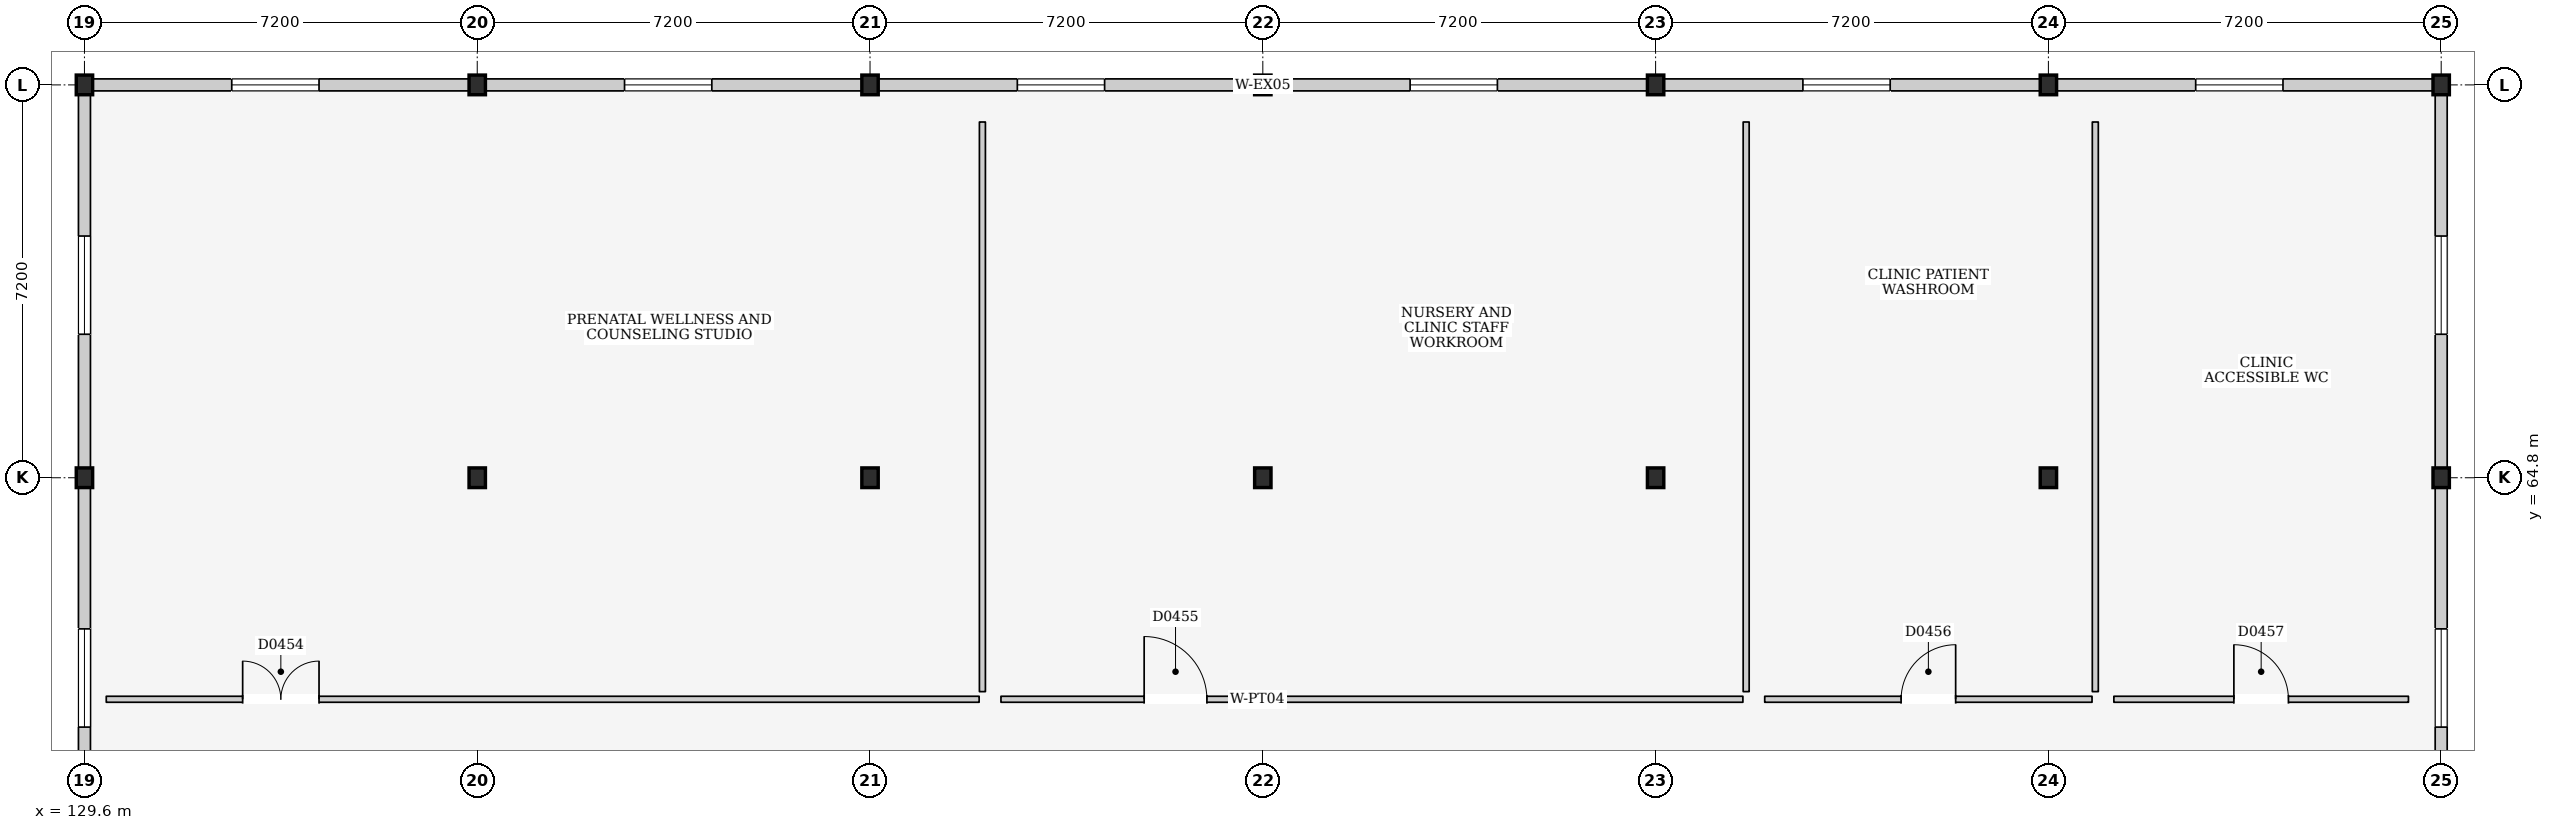
"""IFC4 building model, lengths in metres.
Left out: names, types, materials, properties, quantities, classifications, styles, units other than length and angle.
Written with IfcOpenShell. Run it as: python <this file> out.ifc"""

import sys

from ifc_helpers import new_model, si_unit, direction, frame, frame_2d, origin, origin_2d, place, context, subcontext, project, spatial, rectangle, i_section, extrude, element, fill, save


model = new_model("IFC4")
c1 = context("Model", 3, precision=1e-05, world=origin(), true_north=direction((0.0, 1.0)))
c2 = subcontext(c1, "Body", "Model", "MODEL_VIEW")
j1 = project(units=[si_unit("LENGTHUNIT", "METRE"), si_unit("PLANEANGLEUNIT", "RADIAN")], contexts=[c1])
p1 = place(None, origin())
s1 = spatial("IfcSite", under=j1, at=p1, CompositionType="ELEMENT")
p2 = place(p1, origin())
s2 = spatial("IfcBuilding", under=s1, at=p2, CompositionType="ELEMENT")
p3 = place(p2, frame((0.0, 0.0, 4.5)))
s3 = spatial("IfcBuildingStorey", under=s2, at=p3, CompositionType="ELEMENT", Elevation=4.5)
for number, where, z_axis, x_axis in (
    (1, (129.6, 64.8, 0.0), (0.0, 0.0, 1.0), (1.0, 0.0, 0.0)),
    (2, (129.6, 72.0, 0.0), (0.0, 0.0, 1.0), (1.0, 0.0, 0.0)),
    (3, (136.8, 64.8, 0.0), (0.0, 0.0, 1.0), (1.0, 0.0, 0.0)),
    (4, (136.8, 72.0, 0.0), (0.0, 0.0, 1.0), (1.0, 0.0, 0.0)),
    (5, (144.0, 64.8, 0.0), (0.0, 0.0, 1.0), (1.0, 0.0, 0.0)),
    (6, (144.0, 72.0, 0.0), (0.0, 0.0, 1.0), (1.0, 0.0, 0.0)),
    (7, (151.2, 64.8, 0.0), (0.0, 0.0, 1.0), (1.0, 0.0, 0.0)),
    (8, (151.2, 72.0, 0.0), (0.0, 0.0, 1.0), (1.0, 0.0, 0.0)),
    (9, (158.4, 64.8, 0.0), (0.0, 0.0, 1.0), (1.0, 0.0, 0.0)),
    (10, (158.4, 72.0, 0.0), (0.0, 0.0, 1.0), (1.0, 0.0, 0.0)),
    (11, (165.6, 64.8, 0.0), (0.0, 0.0, 1.0), (1.0, 0.0, 0.0)),
    (12, (165.6, 72.0, 0.0), (0.0, 0.0, 1.0), (1.0, 0.0, 0.0)),
    (13, (172.8, 64.8, 0.0), (0.0, 0.0, 1.0), (1.0, 0.0, 0.0)),
    (14, (172.8, 72.0, 0.0), (0.0, 0.0, 1.0), (1.0, 0.0, 0.0)),
):
    element("IfcColumn", number, at=place(p3, frame(where, z_axis=z_axis, x_axis=x_axis)), inside=s3, PredefinedType="COLUMN", context=c2, shape_type="SweptSolid", body=[
        extrude(i_section(OverallWidth=0.3, OverallDepth=0.36, WebThickness=0.012, FlangeThickness=0.022, at=origin_2d()), origin(), (0.0, 0.0, 1.0), 4.5),
    ])
p4 = place(p3, frame((129.75, 72.0, 0.0), z_axis=(0.0, 0.0, 1.0), x_axis=(1.0, 0.0, 0.0)))
e15 = element("IfcWall", 15, at=p4, inside=s3, PredefinedType="ELEMENTEDWALL", context=c2, shape_type="SweptSolid", body=[
    extrude(rectangle(XDim=6.9, YDim=0.22, at=frame_2d((3.45, 0.0))), origin(), (0.0, 0.0, 1.0), 3.9),
])
p5 = place(p4, frame((2.55, 0.0, 0.95)))
e16 = element("IfcOpeningElement", 16, at=p5, cuts=e15, PredefinedType="OPENING", context=c2, shape_type="SweptSolid", body=[
    extrude(rectangle(XDim=1.6, YDim=1.5, at=frame_2d((0.8, 0.75))), frame((0.0, 0.125, 0.0), z_axis=(0.0, -1.0, 0.0), x_axis=(1.0, 0.0, 0.0)), (0.0, 0.0, 1.0), 0.25),
])
p6 = place(p3, frame((136.95, 72.0, 0.0), z_axis=(0.0, 0.0, 1.0), x_axis=(1.0, 0.0, 0.0)))
e17 = element("IfcWall", 17, at=p6, inside=s3, PredefinedType="ELEMENTEDWALL", context=c2, shape_type="SweptSolid", body=[
    extrude(rectangle(XDim=6.9, YDim=0.22, at=frame_2d((3.45, 0.0))), origin(), (0.0, 0.0, 1.0), 3.9),
])
p7 = place(p6, frame((2.55, 0.0, 0.95)))
e18 = element("IfcOpeningElement", 18, at=p7, cuts=e17, PredefinedType="OPENING", context=c2, shape_type="SweptSolid", body=[
    extrude(rectangle(XDim=1.6, YDim=1.5, at=frame_2d((0.8, 0.75))), frame((0.0, 0.125, 0.0), z_axis=(0.0, -1.0, 0.0), x_axis=(1.0, 0.0, 0.0)), (0.0, 0.0, 1.0), 0.25),
])
p8 = place(p3, frame((144.15, 72.0, 0.0), z_axis=(0.0, 0.0, 1.0), x_axis=(1.0, 0.0, 0.0)))
e19 = element("IfcWall", 19, at=p8, inside=s3, PredefinedType="ELEMENTEDWALL", context=c2, shape_type="SweptSolid", body=[
    extrude(rectangle(XDim=6.9, YDim=0.22, at=frame_2d((3.45, 0.0))), origin(), (0.0, 0.0, 1.0), 3.9),
])
p9 = place(p8, frame((2.55, 0.0, 0.95)))
e20 = element("IfcOpeningElement", 20, at=p9, cuts=e19, PredefinedType="OPENING", context=c2, shape_type="SweptSolid", body=[
    extrude(rectangle(XDim=1.6, YDim=1.5, at=frame_2d((0.8, 0.75))), frame((0.0, 0.125, 0.0), z_axis=(0.0, -1.0, 0.0), x_axis=(1.0, 0.0, 0.0)), (0.0, 0.0, 1.0), 0.25),
])
p10 = place(p3, frame((151.35, 72.0, 0.0), z_axis=(0.0, 0.0, 1.0), x_axis=(1.0, 0.0, 0.0)))
e21 = element("IfcWall", 21, at=p10, inside=s3, PredefinedType="ELEMENTEDWALL", context=c2, shape_type="SweptSolid", body=[
    extrude(rectangle(XDim=6.9, YDim=0.22, at=frame_2d((3.45, 0.0))), origin(), (0.0, 0.0, 1.0), 3.9),
])
p11 = place(p10, frame((2.55, 0.0, 0.95)))
e22 = element("IfcOpeningElement", 22, at=p11, cuts=e21, PredefinedType="OPENING", context=c2, shape_type="SweptSolid", body=[
    extrude(rectangle(XDim=1.6, YDim=1.5, at=frame_2d((0.8, 0.75))), frame((0.0, 0.125, 0.0), z_axis=(0.0, -1.0, 0.0), x_axis=(1.0, 0.0, 0.0)), (0.0, 0.0, 1.0), 0.25),
])
p12 = place(p3, frame((158.55, 72.0, 0.0), z_axis=(0.0, 0.0, 1.0), x_axis=(1.0, 0.0, 0.0)))
e23 = element("IfcWall", 23, at=p12, inside=s3, PredefinedType="ELEMENTEDWALL", context=c2, shape_type="SweptSolid", body=[
    extrude(rectangle(XDim=6.9, YDim=0.22, at=frame_2d((3.45, 0.0))), origin(), (0.0, 0.0, 1.0), 3.9),
])
p13 = place(p12, frame((2.55, 0.0, 0.95)))
e24 = element("IfcOpeningElement", 24, at=p13, cuts=e23, PredefinedType="OPENING", context=c2, shape_type="SweptSolid", body=[
    extrude(rectangle(XDim=1.6, YDim=1.5, at=frame_2d((0.8, 0.75))), frame((0.0, 0.125, 0.0), z_axis=(0.0, -1.0, 0.0), x_axis=(1.0, 0.0, 0.0)), (0.0, 0.0, 1.0), 0.25),
])
p14 = place(p3, frame((165.75, 72.0, 0.0), z_axis=(0.0, 0.0, 1.0), x_axis=(1.0, 0.0, 0.0)))
e25 = element("IfcWall", 25, at=p14, inside=s3, PredefinedType="ELEMENTEDWALL", context=c2, shape_type="SweptSolid", body=[
    extrude(rectangle(XDim=6.9, YDim=0.22, at=frame_2d((3.45, 0.0))), origin(), (0.0, 0.0, 1.0), 3.9),
])
p15 = place(p14, frame((2.55, 0.0, 0.95)))
e26 = element("IfcOpeningElement", 26, at=p15, cuts=e25, PredefinedType="OPENING", context=c2, shape_type="SweptSolid", body=[
    extrude(rectangle(XDim=1.6, YDim=1.5, at=frame_2d((0.8, 0.75))), frame((0.0, 0.125, 0.0), z_axis=(0.0, -1.0, 0.0), x_axis=(1.0, 0.0, 0.0)), (0.0, 0.0, 1.0), 0.25),
])
p16 = place(p3, frame((129.6, 57.78, 0.0), z_axis=(0.0, 0.0, 1.0), x_axis=(0.0, 1.0, 0.0)))
e27 = element("IfcWall", 27, at=p16, inside=s3, PredefinedType="ELEMENTEDWALL", context=c2, shape_type="SweptSolid", body=[
    extrude(rectangle(XDim=6.84, YDim=0.22, at=frame_2d((3.42, 0.0))), origin(), (0.0, 0.0, 1.0), 3.9),
])
p17 = place(p16, frame((2.45, 0.0, 0.9)))
e28 = element("IfcOpeningElement", 28, at=p17, cuts=e27, PredefinedType="OPENING", context=c2, shape_type="SweptSolid", body=[
    extrude(rectangle(XDim=1.8, YDim=1.8, at=frame_2d((0.9, 0.9))), frame((0.0, 0.125, 0.0), z_axis=(0.0, -1.0, 0.0), x_axis=(1.0, 0.0, 0.0)), (0.0, 0.0, 1.0), 0.25),
])
p18 = place(p3, frame((172.8, 57.78, 0.0), z_axis=(0.0, 0.0, 1.0), x_axis=(0.0, 1.0, 0.0)))
e29 = element("IfcWall", 29, at=p18, inside=s3, PredefinedType="ELEMENTEDWALL", context=c2, shape_type="SweptSolid", body=[
    extrude(rectangle(XDim=6.84, YDim=0.22, at=frame_2d((3.42, 0.0))), origin(), (0.0, 0.0, 1.0), 3.9),
])
p19 = place(p18, frame((2.45, 0.0, 0.9)))
e30 = element("IfcOpeningElement", 30, at=p19, cuts=e29, PredefinedType="OPENING", context=c2, shape_type="SweptSolid", body=[
    extrude(rectangle(XDim=1.8, YDim=1.8, at=frame_2d((0.9, 0.9))), frame((0.0, 0.125, 0.0), z_axis=(0.0, -1.0, 0.0), x_axis=(1.0, 0.0, 0.0)), (0.0, 0.0, 1.0), 0.25),
])
p20 = place(p3, frame((129.6, 64.98, 0.0), z_axis=(0.0, 0.0, 1.0), x_axis=(0.0, 1.0, 0.0)))
e31 = element("IfcWall", 31, at=p20, inside=s3, PredefinedType="ELEMENTEDWALL", context=c2, shape_type="SweptSolid", body=[
    extrude(rectangle(XDim=6.84, YDim=0.22, at=frame_2d((3.42, 0.0))), origin(), (0.0, 0.0, 1.0), 3.9),
])
p21 = place(p20, frame((2.45, 0.0, 0.9)))
e32 = element("IfcOpeningElement", 32, at=p21, cuts=e31, PredefinedType="OPENING", context=c2, shape_type="SweptSolid", body=[
    extrude(rectangle(XDim=1.8, YDim=1.8, at=frame_2d((0.9, 0.9))), frame((0.0, 0.125, 0.0), z_axis=(0.0, -1.0, 0.0), x_axis=(1.0, 0.0, 0.0)), (0.0, 0.0, 1.0), 0.25),
])
p22 = place(p3, frame((172.8, 64.98, 0.0), z_axis=(0.0, 0.0, 1.0), x_axis=(0.0, 1.0, 0.0)))
e33 = element("IfcWall", 33, at=p22, inside=s3, PredefinedType="ELEMENTEDWALL", context=c2, shape_type="SweptSolid", body=[
    extrude(rectangle(XDim=6.84, YDim=0.22, at=frame_2d((3.42, 0.0))), origin(), (0.0, 0.0, 1.0), 3.9),
])
p23 = place(p22, frame((2.45, 0.0, 0.9)))
e34 = element("IfcOpeningElement", 34, at=p23, cuts=e33, PredefinedType="OPENING", context=c2, shape_type="SweptSolid", body=[
    extrude(rectangle(XDim=1.8, YDim=1.8, at=frame_2d((0.9, 0.9))), frame((0.0, 0.125, 0.0), z_axis=(0.0, -1.0, 0.0), x_axis=(1.0, 0.0, 0.0)), (0.0, 0.0, 1.0), 0.25),
])
p24 = place(p3, frame((130.0, 60.74, 0.0), z_axis=(0.0, 0.0, 1.0), x_axis=(1.0, 0.0, 0.0)))
e35 = element("IfcWall", 35, at=p24, inside=s3, PredefinedType="PARTITIONING", context=c2, shape_type="SweptSolid", body=[
    extrude(rectangle(XDim=16.0, YDim=0.11, at=frame_2d((8.0, 0.0))), origin(), (0.0, 0.0, 1.0), 4.25),
])
p25 = place(p24, frame((2.5, 0.0, 0.0)))
e36 = element("IfcOpeningElement", 36, at=p25, cuts=e35, PredefinedType="OPENING", context=c2, shape_type="SweptSolid", body=[
    extrude(rectangle(XDim=1.4, YDim=2.25, at=frame_2d((0.7, 1.125))), frame((0.0, 0.07, 0.0), z_axis=(0.0, -1.0, 0.0), x_axis=(1.0, 0.0, 0.0)), (0.0, 0.0, 1.0), 0.14),
])
p26 = place(p3, frame((146.06, 60.88, 0.0), z_axis=(0.0, 0.0, 1.0), x_axis=(0.0, 1.0, 0.0)))
e37 = element("IfcWall", 37, at=p26, inside=s3, PredefinedType="PARTITIONING", context=c2, shape_type="SweptSolid", body=[
    extrude(rectangle(XDim=10.44, YDim=0.11, at=frame_2d((5.22, 0.0))), origin(), (0.0, 0.0, 1.0), 4.25),
])
p27 = place(p3, frame((146.4, 60.74, 0.0), z_axis=(0.0, 0.0, 1.0), x_axis=(1.0, 0.0, 0.0)))
e38 = element("IfcWall", 38, at=p27, inside=s3, PredefinedType="PARTITIONING", context=c2, shape_type="SweptSolid", body=[
    extrude(rectangle(XDim=13.6, YDim=0.11, at=frame_2d((6.8, 0.0))), origin(), (0.0, 0.0, 1.0), 4.25),
])
p28 = place(p27, frame((2.625, 0.0, 0.0)))
e39 = element("IfcOpeningElement", 39, at=p28, cuts=e38, PredefinedType="OPENING", context=c2, shape_type="SweptSolid", body=[
    extrude(rectangle(XDim=1.15, YDim=2.25, at=frame_2d((0.575, 1.125))), frame((0.0, 0.07, 0.0), z_axis=(0.0, -1.0, 0.0), x_axis=(1.0, 0.0, 0.0)), (0.0, 0.0, 1.0), 0.14),
])
p29 = place(p3, frame((160.06, 60.88, 0.0), z_axis=(0.0, 0.0, 1.0), x_axis=(0.0, 1.0, 0.0)))
e40 = element("IfcWall", 40, at=p29, inside=s3, PredefinedType="PARTITIONING", context=c2, shape_type="SweptSolid", body=[
    extrude(rectangle(XDim=10.44, YDim=0.11, at=frame_2d((5.22, 0.0))), origin(), (0.0, 0.0, 1.0), 4.25),
])
p30 = place(p3, frame((160.4, 60.74, 0.0), z_axis=(0.0, 0.0, 1.0), x_axis=(1.0, 0.0, 0.0)))
e41 = element("IfcWall", 41, at=p30, inside=s3, PredefinedType="PARTITIONING", context=c2, shape_type="SweptSolid", body=[
    extrude(rectangle(XDim=6.0, YDim=0.11, at=frame_2d((3.0, 0.0))), origin(), (0.0, 0.0, 1.0), 4.25),
])
p31 = place(p30, frame((2.5, 0.0, 0.0)))
e42 = element("IfcOpeningElement", 42, at=p31, cuts=e41, PredefinedType="OPENING", context=c2, shape_type="SweptSolid", body=[
    extrude(rectangle(XDim=1.0, YDim=2.1, at=frame_2d((0.5, 1.05))), frame((0.0, 0.07, 0.0), z_axis=(0.0, -1.0, 0.0), x_axis=(1.0, 0.0, 0.0)), (0.0, 0.0, 1.0), 0.14),
])
p32 = place(p3, frame((166.46, 60.88, 0.0), z_axis=(0.0, 0.0, 1.0), x_axis=(0.0, 1.0, 0.0)))
e43 = element("IfcWall", 43, at=p32, inside=s3, PredefinedType="PARTITIONING", context=c2, shape_type="SweptSolid", body=[
    extrude(rectangle(XDim=10.44, YDim=0.11, at=frame_2d((5.22, 0.0))), origin(), (0.0, 0.0, 1.0), 4.25),
])
p33 = place(p3, frame((166.8, 60.74, 0.0), z_axis=(0.0, 0.0, 1.0), x_axis=(1.0, 0.0, 0.0)))
e44 = element("IfcWall", 44, at=p33, inside=s3, PredefinedType="PARTITIONING", context=c2, shape_type="SweptSolid", body=[
    extrude(rectangle(XDim=5.4, YDim=0.11, at=frame_2d((2.7, 0.0))), origin(), (0.0, 0.0, 1.0), 4.25),
])
p34 = place(p33, frame((2.2, 0.0, 0.0)))
e45 = element("IfcOpeningElement", 45, at=p34, cuts=e44, PredefinedType="OPENING", context=c2, shape_type="SweptSolid", body=[
    extrude(rectangle(XDim=1.0, YDim=2.1, at=frame_2d((0.5, 1.05))), frame((0.0, 0.07, 0.0), z_axis=(0.0, -1.0, 0.0), x_axis=(1.0, 0.0, 0.0)), (0.0, 0.0, 1.0), 0.14),
])
p35 = place(p5, origin())
e46 = element("IfcWindow", 46, at=p35, inside=s3, PartitioningType="DOUBLE_PANEL_VERTICAL", PredefinedType="WINDOW", context=c2, shape_type="SweptSolid", body=[
    extrude(rectangle(XDim=1.6, YDim=1.5, at=frame_2d((0.8, 0.75))), frame((0.0, 0.03, 0.0), z_axis=(0.0, -1.0, 0.0), x_axis=(1.0, 0.0, 0.0)), (0.0, 0.0, 1.0), 0.06),
])
fill(e16, e46)
p36 = place(p7, origin())
e47 = element("IfcWindow", 47, at=p36, inside=s3, PartitioningType="DOUBLE_PANEL_VERTICAL", PredefinedType="WINDOW", context=c2, shape_type="SweptSolid", body=[
    extrude(rectangle(XDim=1.6, YDim=1.5, at=frame_2d((0.8, 0.75))), frame((0.0, 0.03, 0.0), z_axis=(0.0, -1.0, 0.0), x_axis=(1.0, 0.0, 0.0)), (0.0, 0.0, 1.0), 0.06),
])
fill(e18, e47)
p37 = place(p9, origin())
e48 = element("IfcWindow", 48, at=p37, inside=s3, PartitioningType="DOUBLE_PANEL_VERTICAL", PredefinedType="WINDOW", context=c2, shape_type="SweptSolid", body=[
    extrude(rectangle(XDim=1.6, YDim=1.5, at=frame_2d((0.8, 0.75))), frame((0.0, 0.03, 0.0), z_axis=(0.0, -1.0, 0.0), x_axis=(1.0, 0.0, 0.0)), (0.0, 0.0, 1.0), 0.06),
])
fill(e20, e48)
p38 = place(p11, origin())
e49 = element("IfcWindow", 49, at=p38, inside=s3, PartitioningType="DOUBLE_PANEL_VERTICAL", PredefinedType="WINDOW", context=c2, shape_type="SweptSolid", body=[
    extrude(rectangle(XDim=1.6, YDim=1.5, at=frame_2d((0.8, 0.75))), frame((0.0, 0.03, 0.0), z_axis=(0.0, -1.0, 0.0), x_axis=(1.0, 0.0, 0.0)), (0.0, 0.0, 1.0), 0.06),
])
fill(e22, e49)
p39 = place(p13, origin())
e50 = element("IfcWindow", 50, at=p39, inside=s3, PartitioningType="DOUBLE_PANEL_VERTICAL", PredefinedType="WINDOW", context=c2, shape_type="SweptSolid", body=[
    extrude(rectangle(XDim=1.6, YDim=1.5, at=frame_2d((0.8, 0.75))), frame((0.0, 0.03, 0.0), z_axis=(0.0, -1.0, 0.0), x_axis=(1.0, 0.0, 0.0)), (0.0, 0.0, 1.0), 0.06),
])
fill(e24, e50)
p40 = place(p15, origin())
e51 = element("IfcWindow", 51, at=p40, inside=s3, PartitioningType="DOUBLE_PANEL_VERTICAL", PredefinedType="WINDOW", context=c2, shape_type="SweptSolid", body=[
    extrude(rectangle(XDim=1.6, YDim=1.5, at=frame_2d((0.8, 0.75))), frame((0.0, 0.03, 0.0), z_axis=(0.0, -1.0, 0.0), x_axis=(1.0, 0.0, 0.0)), (0.0, 0.0, 1.0), 0.06),
])
fill(e26, e51)
p41 = place(p17, origin())
e52 = element("IfcWindow", 52, at=p41, inside=s3, PartitioningType="DOUBLE_PANEL_VERTICAL", PredefinedType="WINDOW", context=c2, shape_type="SweptSolid", body=[
    extrude(rectangle(XDim=1.8, YDim=1.8, at=frame_2d((0.9, 0.9))), frame((0.0, 0.03, 0.0), z_axis=(0.0, -1.0, 0.0), x_axis=(1.0, 0.0, 0.0)), (0.0, 0.0, 1.0), 0.06),
])
fill(e28, e52)
p42 = place(p19, origin())
e53 = element("IfcWindow", 53, at=p42, inside=s3, PartitioningType="DOUBLE_PANEL_VERTICAL", PredefinedType="WINDOW", context=c2, shape_type="SweptSolid", body=[
    extrude(rectangle(XDim=1.8, YDim=1.8, at=frame_2d((0.9, 0.9))), frame((0.0, 0.03, 0.0), z_axis=(0.0, -1.0, 0.0), x_axis=(1.0, 0.0, 0.0)), (0.0, 0.0, 1.0), 0.06),
])
fill(e30, e53)
p43 = place(p21, origin())
e54 = element("IfcWindow", 54, at=p43, inside=s3, PartitioningType="DOUBLE_PANEL_VERTICAL", PredefinedType="WINDOW", context=c2, shape_type="SweptSolid", body=[
    extrude(rectangle(XDim=1.8, YDim=1.8, at=frame_2d((0.9, 0.9))), frame((0.0, 0.03, 0.0), z_axis=(0.0, -1.0, 0.0), x_axis=(1.0, 0.0, 0.0)), (0.0, 0.0, 1.0), 0.06),
])
fill(e32, e54)
p44 = place(p23, origin())
e55 = element("IfcWindow", 55, at=p44, inside=s3, PartitioningType="DOUBLE_PANEL_VERTICAL", PredefinedType="WINDOW", context=c2, shape_type="SweptSolid", body=[
    extrude(rectangle(XDim=1.8, YDim=1.8, at=frame_2d((0.9, 0.9))), frame((0.0, 0.03, 0.0), z_axis=(0.0, -1.0, 0.0), x_axis=(1.0, 0.0, 0.0)), (0.0, 0.0, 1.0), 0.06),
])
fill(e34, e55)
p45 = place(p25, origin())
e56 = element("IfcDoor", 56, at=p45, inside=s3, OperationType="DOUBLE_DOOR_SINGLE_SWING", PredefinedType="DOOR", context=c2, shape_type="SweptSolid", body=[
    extrude(rectangle(XDim=1.4, YDim=2.25, at=frame_2d((0.7, 1.125))), frame((0.0, 0.025, 0.0), z_axis=(0.0, -1.0, 0.0), x_axis=(1.0, 0.0, 0.0)), (0.0, 0.0, 1.0), 0.05),
])
fill(e36, e56)
p46 = place(p28, origin())
e57 = element("IfcDoor", 57, at=p46, inside=s3, OperationType="SINGLE_SWING_LEFT", PredefinedType="DOOR", context=c2, shape_type="SweptSolid", body=[
    extrude(rectangle(XDim=1.15, YDim=2.25, at=frame_2d((0.575, 1.125))), frame((0.0, 0.025, 0.0), z_axis=(0.0, -1.0, 0.0), x_axis=(1.0, 0.0, 0.0)), (0.0, 0.0, 1.0), 0.05),
])
fill(e39, e57)
p47 = place(p31, origin())
e58 = element("IfcDoor", 58, at=p47, inside=s3, OperationType="SINGLE_SWING_RIGHT", PredefinedType="DOOR", context=c2, shape_type="SweptSolid", body=[
    extrude(rectangle(XDim=1.0, YDim=2.1, at=frame_2d((0.5, 1.05))), frame((0.0, 0.025, 0.0), z_axis=(0.0, -1.0, 0.0), x_axis=(1.0, 0.0, 0.0)), (0.0, 0.0, 1.0), 0.05),
])
fill(e42, e58)
p48 = place(p34, origin())
e59 = element("IfcDoor", 59, at=p48, inside=s3, OperationType="SINGLE_SWING_LEFT", PredefinedType="DOOR", context=c2, shape_type="SweptSolid", body=[
    extrude(rectangle(XDim=1.0, YDim=2.1, at=frame_2d((0.5, 1.05))), frame((0.0, 0.025, 0.0), z_axis=(0.0, -1.0, 0.0), x_axis=(1.0, 0.0, 0.0)), (0.0, 0.0, 1.0), 0.05),
])
fill(e45, e59)
save(model, sys.argv[1])
